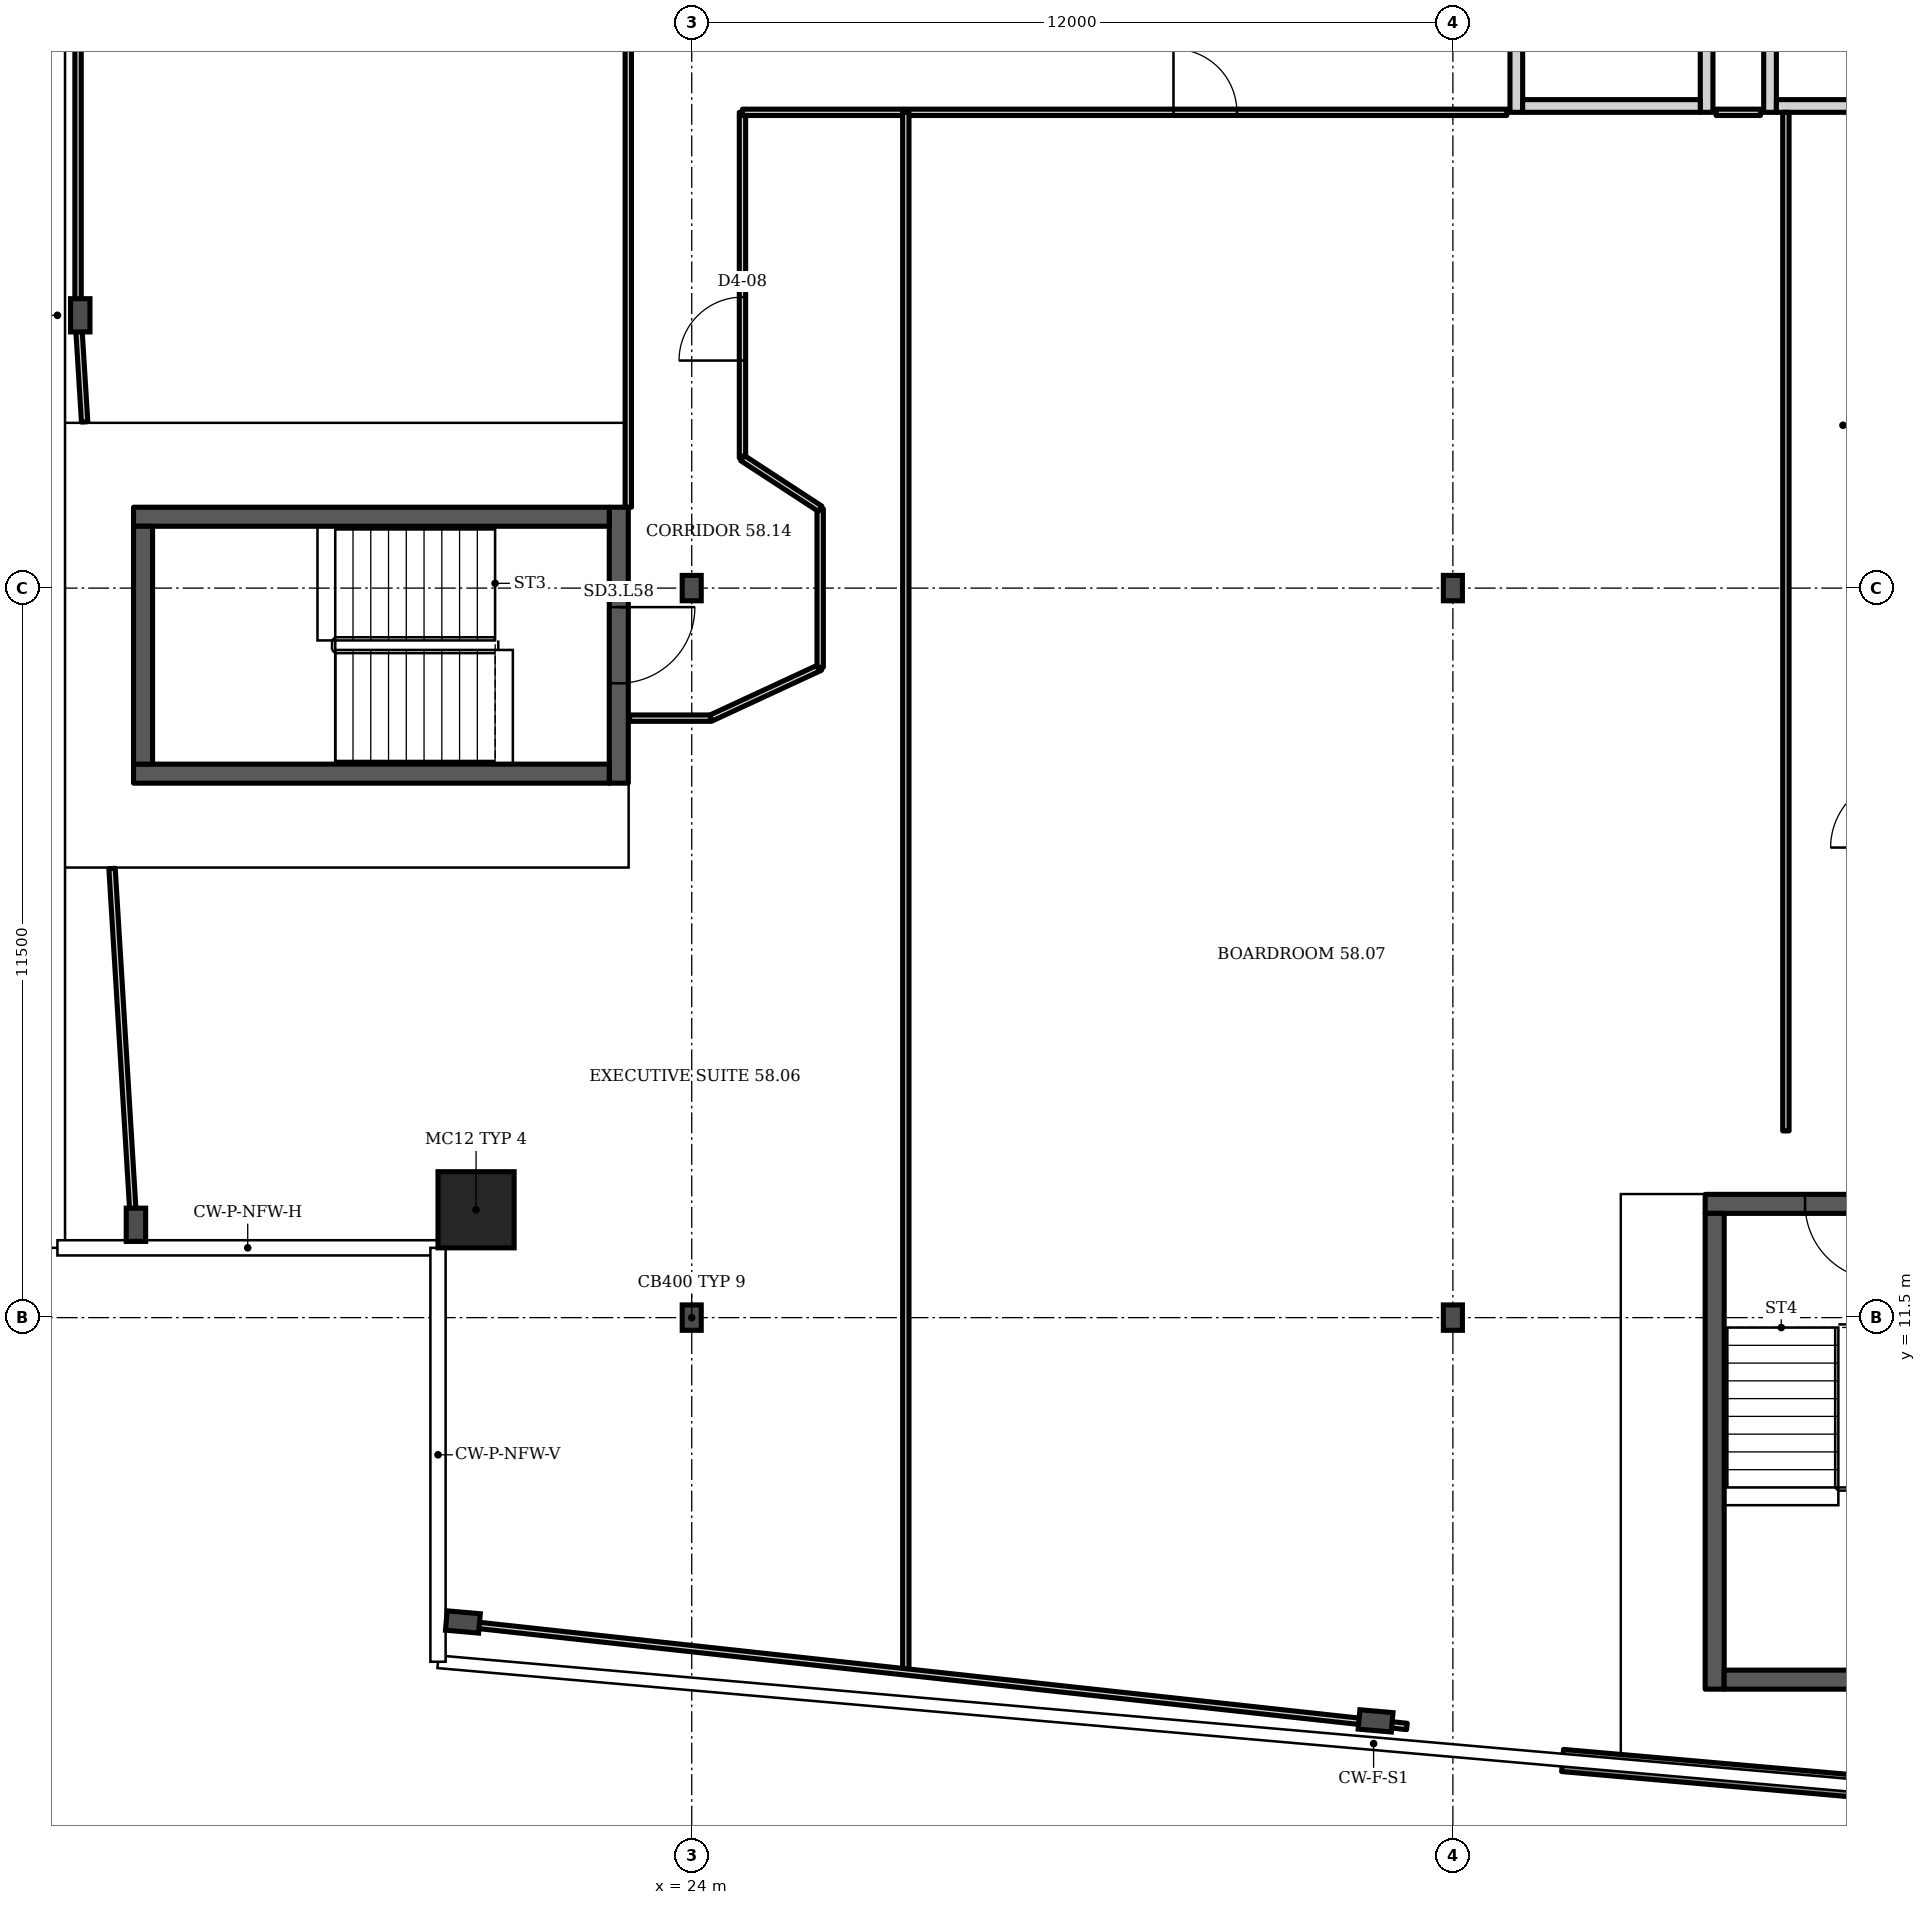
"""IFC4 building model, lengths in metres.
Left out: names, types, materials, properties, quantities, classifications, styles, units other than length and angle.
Written with IfcOpenShell. Run it as: python <this file> out.ifc"""

import sys

from ifc_helpers import new_model, si_unit, direction, frame, frame_2d, origin, origin_2d, place, context, subcontext, project, spatial, rectangle, i_section, extrude, element, fill, save


model = new_model("IFC4")
c1 = context("Model", 3, precision=1e-05, world=origin(), true_north=direction((0.0, 1.0)))
c2 = subcontext(c1, "Body", "Model", "MODEL_VIEW")
j1 = project(units=[si_unit("LENGTHUNIT", "METRE"), si_unit("PLANEANGLEUNIT", "RADIAN")], contexts=[c1])
p1 = place(None, origin())
s1 = spatial("IfcSite", under=j1, at=p1, CompositionType="ELEMENT")
p2 = place(p1, origin())
s2 = spatial("IfcBuilding", under=s1, at=p2, CompositionType="ELEMENT")
p3 = place(p2, frame((0.0, 0.0, 232.3)))
s3 = spatial("IfcBuildingStorey", under=s2, at=p3, CompositionType="ELEMENT", Elevation=232.3)
p4 = place(p3, frame((20.6, 13.2, 0.0), z_axis=(0.0, 0.0, 1.0), x_axis=(1.0, 0.0, 0.0)))
e1 = element("IfcColumn", 1, at=p4, inside=s3, PredefinedType="COLUMN", context=c2, shape_type="SweptSolid", body=[
    extrude(rectangle(XDim=1.2, YDim=1.2, at=origin_2d()), origin(), (0.0, 0.0, 1.0), 3.6),
])
for number, where, z_axis, x_axis in (
    (2, (20.392, 6.703, 0.0), (0.0, 0.0, 1.0), (-0.087, -0.996, 0.0)),
    (3, (34.781, 5.143, 0.0), (0.0, 0.0, 1.0), (-0.087, -0.996, 0.0)),
    (4, (14.36, 27.3, 0.0), (0.0, 0.0, 1.0), (-1.0, 0.0, 0.0)),
    (5, (15.238, 12.963, 0.0), (0.0, 0.0, 1.0), (-1.0, 0.0, 0.0)),
):
    element("IfcColumn", number, at=place(p3, frame(where, z_axis=z_axis, x_axis=x_axis)), inside=s3, PredefinedType="COLUMN", context=c2, shape_type="SweptSolid", body=[
        extrude(i_section(OverallWidth=0.306, OverallDepth=0.524, WebThickness=0.021, FlangeThickness=0.04, FilletRadius=0.027, at=origin_2d()), origin(), (0.0, 0.0, 1.0), 3.6),
    ])
for number, where, z_axis, x_axis in (
    (6, (24.0, 11.5, 0.0), (0.0, 0.0, 1.0), (1.0, 0.0, 0.0)),
    (7, (36.0, 11.5, 0.0), (0.0, 0.0, 1.0), (1.0, 0.0, 0.0)),
    (8, (24.0, 23.0, 0.0), (0.0, 0.0, 1.0), (1.0, 0.0, 0.0)),
    (9, (36.0, 23.0, 0.0), (0.0, 0.0, 1.0), (1.0, 0.0, 0.0)),
):
    element("IfcColumn", number, at=place(p3, frame(where, z_axis=z_axis, x_axis=x_axis)), inside=s3, PredefinedType="COLUMN", context=c2, shape_type="SweptSolid", body=[
        extrude(i_section(OverallWidth=0.3, OverallDepth=0.4, WebThickness=0.013, FlangeThickness=0.024, FilletRadius=0.027, at=origin_2d()), origin(), (0.0, 0.0, 1.0), 3.6),
    ])
p5 = place(p3, frame((37.729, 4.519, 0.0), z_axis=(0.0, 0.0, 1.0), x_axis=(0.99619, -0.087167, 0.0)))
e10 = element("IfcWall", 10, at=p5, inside=s3, PredefinedType="SOLIDWALL", context=c2, shape_type="SweptSolid", body=[
    extrude(rectangle(XDim=11.831, YDim=0.35, at=frame_2d((5.915, 0.0))), origin(), (0.0, 0.0, 1.0), 1.0),
])
p6 = place(p3, frame((37.0, 30.5, 0.0), z_axis=(0.0, 0.0, 1.0), x_axis=(0.0, 1.0, 0.0)))
e11 = element("IfcWall", 11, at=p6, inside=s3, PredefinedType="PARTITIONING", context=c2, shape_type="SweptSolid", body=[
    extrude(rectangle(XDim=3.5, YDim=0.2, at=frame_2d((1.75, 0.0))), origin(), (0.0, 0.0, 1.0), 3.2),
])
p7 = place(p6, frame((1.2, 0.0, 0.0)))
e12 = element("IfcOpeningElement", 12, at=p7, cuts=e11, PredefinedType="OPENING", context=c2, shape_type="SweptSolid", body=[
    extrude(rectangle(XDim=1.1, YDim=2.1, at=frame_2d((0.55, 1.05))), frame((0.0, 0.11, 0.0), z_axis=(0.0, -1.0, 0.0), x_axis=(1.0, 0.0, 0.0)), (0.0, 0.0, 1.0), 0.22),
])
p8 = place(p3, frame((40.0, 30.5, 0.0), z_axis=(0.0, 0.0, 1.0), x_axis=(0.0, 1.0, 0.0)))
e13 = element("IfcWall", 13, at=p8, inside=s3, PredefinedType="PARTITIONING", context=c2, shape_type="SweptSolid", body=[
    extrude(rectangle(XDim=3.5, YDim=0.2, at=frame_2d((1.75, 0.0))), origin(), (0.0, 0.0, 1.0), 3.2),
])
p9 = place(p3, frame((37.1, 30.6, 0.0), z_axis=(0.0, 0.0, 1.0), x_axis=(1.0, 0.0, 0.0)))
e14 = element("IfcWall", 14, at=p9, inside=s3, PredefinedType="PARTITIONING", context=c2, shape_type="SweptSolid", body=[
    extrude(rectangle(XDim=2.8, YDim=0.2, at=frame_2d((1.4, 0.0))), origin(), (0.0, 0.0, 1.0), 3.2),
])
p10 = place(p3, frame((41.0, 30.5, 0.0), z_axis=(0.0, 0.0, 1.0), x_axis=(0.0, 1.0, 0.0)))
e15 = element("IfcWall", 15, at=p10, inside=s3, PredefinedType="PARTITIONING", context=c2, shape_type="SweptSolid", body=[
    extrude(rectangle(XDim=3.5, YDim=0.2, at=frame_2d((1.75, 0.0))), origin(), (0.0, 0.0, 1.0), 3.2),
])
p11 = place(p3, frame((41.1, 30.6, 0.0), z_axis=(0.0, 0.0, 1.0), x_axis=(1.0, 0.0, 0.0)))
e16 = element("IfcWall", 16, at=p11, inside=s3, PredefinedType="PARTITIONING", context=c2, shape_type="SweptSolid", body=[
    extrude(rectangle(XDim=2.8, YDim=0.2, at=frame_2d((1.4, 0.0))), origin(), (0.0, 0.0, 1.0), 3.2),
])
p12 = place(p3, frame((22.85, 19.925, 0.0), z_axis=(0.0, 0.0, 1.0), x_axis=(0.0, 1.0, 0.0)))
e17 = element("IfcWall", 17, at=p12, inside=s3, PredefinedType="SHEAR", context=c2, shape_type="SweptSolid", body=[
    extrude(rectangle(XDim=4.35, YDim=0.3, at=frame_2d((2.175, 0.0))), origin(), (0.0, 0.0, 1.0), 3.2),
])
p13 = place(p12, frame((1.575, 0.0, 0.0)))
e18 = element("IfcOpeningElement", 18, at=p13, cuts=e17, PredefinedType="OPENING", context=c2, shape_type="SweptSolid", body=[
    extrude(rectangle(XDim=1.2, YDim=2.1, at=frame_2d((0.6, 1.05))), frame((0.0, 0.16, 0.0), z_axis=(0.0, -1.0, 0.0), x_axis=(1.0, 0.0, 0.0)), (0.0, 0.0, 1.0), 0.32),
])
p14 = place(p3, frame((39.977, 13.293, 0.0), z_axis=(0.0, 0.0, 1.0), x_axis=(1.0, 0.0, 0.0)))
e19 = element("IfcWall", 19, at=p14, inside=s3, PredefinedType="SHEAR", context=c2, shape_type="SweptSolid", body=[
    extrude(rectangle(XDim=4.35, YDim=0.3, at=frame_2d((2.175, 0.0))), origin(), (0.0, 0.0, 1.0), 3.2),
])
p15 = place(p14, frame((1.575, 0.0, 0.0)))
e20 = element("IfcOpeningElement", 20, at=p15, cuts=e19, PredefinedType="OPENING", context=c2, shape_type="SweptSolid", body=[
    extrude(rectangle(XDim=1.2, YDim=2.1, at=frame_2d((0.6, 1.05))), frame((0.0, 0.16, 0.0), z_axis=(0.0, -1.0, 0.0), x_axis=(1.0, 0.0, 0.0)), (0.0, 0.0, 1.0), 0.32),
])
p16 = place(p3, frame((14.325, 27.3, 0.0), z_axis=(0.0, 0.0, 1.0), x_axis=(0.0, 1.0, 0.0)))
e21 = element("IfcWall", 21, at=p16, inside=s3, PredefinedType="PARTITIONING", context=c2, shape_type="SweptSolid", body=[
    extrude(rectangle(XDim=14.68, YDim=0.1, at=frame_2d((7.34, 0.0))), origin(), (0.0, 0.0, 1.0), 2.58),
])
p17 = place(p3, frame((14.429, 25.62, 0.0), z_axis=(0.0, 0.0, 1.0), x_axis=(-0.061647, 0.998101, 0.0)))
e22 = element("IfcWall", 22, at=p17, inside=s3, PredefinedType="PARTITIONING", context=c2, shape_type="SweptSolid", body=[
    extrude(rectangle(XDim=1.683, YDim=0.1, at=frame_2d((0.842, 0.0))), origin(), (0.0, 0.0, 1.0), 3.2),
])
p18 = place(p3, frame((15.224, 12.62, 0.0), z_axis=(0.0, 0.0, 1.0), x_axis=(-0.060759, 0.998149, 0.0)))
e23 = element("IfcWall", 23, at=p18, inside=s3, PredefinedType="PARTITIONING", context=c2, shape_type="SweptSolid", body=[
    extrude(rectangle(XDim=5.971, YDim=0.1, at=frame_2d((2.985, 0.0))), origin(), (0.0, 0.0, 1.0), 3.2),
])
p19 = place(p3, frame((23.0, 24.275, 0.0), z_axis=(0.0, 0.0, 1.0), x_axis=(0.0, 1.0, 0.0)))
e24 = element("IfcWall", 24, at=p19, inside=s3, PredefinedType="PARTITIONING", context=c2, shape_type="SweptSolid", body=[
    extrude(rectangle(XDim=9.705, YDim=0.1, at=frame_2d((4.853, 0.0))), origin(), (0.0, 0.0, 1.0), 3.2),
])
p20 = place(p19, frame((7.905, 0.0, 0.0)))
e25 = element("IfcOpeningElement", 25, at=p20, cuts=e24, PredefinedType="OPENING", context=c2, shape_type="SweptSolid", body=[
    extrude(rectangle(XDim=1.0, YDim=2.1, at=frame_2d((0.5, 1.05))), frame((0.0, 0.06, 0.0), z_axis=(0.0, -1.0, 0.0), x_axis=(1.0, 0.0, 0.0)), (0.0, 0.0, 1.0), 0.12),
])
p21 = place(p3, frame((23.02, 20.95, 0.0), z_axis=(0.0, 0.0, 1.0), x_axis=(1.0, 0.0, 0.0)))
e26 = element("IfcWall", 26, at=p21, inside=s3, PredefinedType="PARTITIONING", context=c2, shape_type="SweptSolid", body=[
    extrude(rectangle(XDim=1.28, YDim=0.1, at=frame_2d((0.64, 0.0))), origin(), (0.0, 0.0, 1.0), 3.2),
])
p22 = place(p3, frame((24.3, 20.95, 0.0), z_axis=(0.0, 0.0, 1.0), x_axis=(0.907168, 0.420777, 0.0)))
e27 = element("IfcWall", 27, at=p22, inside=s3, PredefinedType="PARTITIONING", context=c2, shape_type="SweptSolid", body=[
    extrude(rectangle(XDim=1.901, YDim=0.1, at=frame_2d((0.951, 0.0))), origin(), (0.0, 0.0, 1.0), 3.2),
])
p23 = place(p3, frame((24.8, 25.05, 0.0), z_axis=(0.0, 0.0, 1.0), x_axis=(0.0, 1.0, 0.0)))
e28 = element("IfcWall", 28, at=p23, inside=s3, PredefinedType="PARTITIONING", context=c2, shape_type="SweptSolid", body=[
    extrude(rectangle(XDim=5.45, YDim=0.1, at=frame_2d((2.725, 0.0))), origin(), (0.0, 0.0, 1.0), 3.2),
])
p24 = place(p23, frame((1.537, 0.0, 0.0)))
e29 = element("IfcOpeningElement", 29, at=p24, cuts=e28, PredefinedType="OPENING", context=c2, shape_type="SweptSolid", body=[
    extrude(rectangle(XDim=1.0, YDim=2.1, at=frame_2d((0.5, 1.05))), frame((0.0, 0.06, 0.0), z_axis=(0.0, -1.0, 0.0), x_axis=(1.0, 0.0, 0.0)), (0.0, 0.0, 1.0), 0.12),
])
p25 = place(p3, frame((24.8, 30.5, 0.0), z_axis=(0.0, 0.0, 1.0), x_axis=(1.0, 0.0, 0.0)))
e30 = element("IfcWall", 30, at=p25, inside=s3, PredefinedType="PARTITIONING", context=c2, shape_type="SweptSolid", body=[
    extrude(rectangle(XDim=12.05, YDim=0.1, at=frame_2d((6.025, 0.0))), origin(), (0.0, 0.0, 1.0), 3.2),
])
p26 = place(p25, frame((6.795, 0.0, 0.0)))
e31 = element("IfcOpeningElement", 31, at=p26, cuts=e30, PredefinedType="OPENING", context=c2, shape_type="SweptSolid", body=[
    extrude(rectangle(XDim=1.0, YDim=2.1, at=frame_2d((0.5, 1.05))), frame((0.0, 0.06, 0.0), z_axis=(0.0, -1.0, 0.0), x_axis=(1.0, 0.0, 0.0)), (0.0, 0.0, 1.0), 0.12),
])
p27 = place(p3, frame((26.025, 21.75, 0.0), z_axis=(0.0, 0.0, 1.0), x_axis=(0.0, 1.0, 0.0)))
e32 = element("IfcWall", 32, at=p27, inside=s3, PredefinedType="PARTITIONING", context=c2, shape_type="SweptSolid", body=[
    extrude(rectangle(XDim=2.5, YDim=0.1, at=frame_2d((1.25, 0.0))), origin(), (0.0, 0.0, 1.0), 3.2),
])
p28 = place(p3, frame((26.025, 24.25, 0.0), z_axis=(0.0, 0.0, 1.0), x_axis=(-0.837222, 0.546856, 0.0)))
e33 = element("IfcWall", 33, at=p28, inside=s3, PredefinedType="PARTITIONING", context=c2, shape_type="SweptSolid", body=[
    extrude(rectangle(XDim=1.463, YDim=0.1, at=frame_2d((0.731, 0.0))), origin(), (0.0, 0.0, 1.0), 3.2),
])
p29 = place(p3, frame((27.375, 5.915, 0.0), z_axis=(0.0, 0.0, 1.0), x_axis=(0.0, 1.0, 0.0)))
e34 = element("IfcWall", 34, at=p29, inside=s3, PredefinedType="PARTITIONING", context=c2, shape_type="SweptSolid", body=[
    extrude(rectangle(XDim=24.585, YDim=0.1, at=frame_2d((12.292, 0.0))), origin(), (0.0, 0.0, 1.0), 3.2),
])
p30 = place(p3, frame((35.275, 5.055, 0.0), z_axis=(0.0, 0.0, 1.0), x_axis=(-0.994128, 0.108228, 0.0)))
e35 = element("IfcWall", 35, at=p30, inside=s3, PredefinedType="PARTITIONING", context=c2, shape_type="SweptSolid", body=[
    extrude(rectangle(XDim=15.335, YDim=0.1, at=frame_2d((7.667, 0.0))), origin(), (0.0, 0.0, 1.0), 2.58),
])
p31 = place(p3, frame((41.25, 14.443, 0.0), z_axis=(0.0, 0.0, 1.0), x_axis=(0.0, 1.0, 0.0)))
e36 = element("IfcWall", 36, at=p31, inside=s3, PredefinedType="PARTITIONING", context=c2, shape_type="SweptSolid", body=[
    extrude(rectangle(XDim=16.057, YDim=0.1, at=frame_2d((8.028, 0.0))), origin(), (0.0, 0.0, 1.0), 3.2),
])
p32 = place(p3, frame((40.15, 30.5, 0.0), z_axis=(0.0, 0.0, 1.0), x_axis=(1.0, 0.0, 0.0)))
e37 = element("IfcWall", 37, at=p32, inside=s3, PredefinedType="PARTITIONING", context=c2, shape_type="SweptSolid", body=[
    extrude(rectangle(XDim=0.7, YDim=0.1, at=frame_2d((0.35, 0.0))), origin(), (0.0, 0.0, 1.0), 3.2),
])
for number, where, z_axis, x_axis in (
    (38, (15.2, 20.075, 0.0), (0.0, 0.0, 1.0), (1.0, 0.0, 0.0)),
    (39, (15.2, 24.125, 0.0), (0.0, 0.0, 1.0), (1.0, 0.0, 0.0)),
):
    element("IfcWall", number, at=place(p3, frame(where, z_axis=z_axis, x_axis=x_axis)), inside=s3, PredefinedType="SHEAR", context=c2, shape_type="SweptSolid", body=[
        extrude(rectangle(XDim=7.5, YDim=0.3, at=frame_2d((3.75, 0.0))), origin(), (0.0, 0.0, 1.0), 3.2),
    ])
p33 = place(p3, frame((15.35, 20.225, 0.0), z_axis=(0.0, 0.0, 1.0), x_axis=(0.0, 1.0, 0.0)))
e40 = element("IfcWall", 40, at=p33, inside=s3, PredefinedType="SHEAR", context=c2, shape_type="SweptSolid", body=[
    extrude(rectangle(XDim=3.75, YDim=0.3, at=frame_2d((1.875, 0.0))), origin(), (0.0, 0.0, 1.0), 3.2),
])
p34 = place(p3, frame((40.127, 5.643, 0.0), z_axis=(0.0, 0.0, 1.0), x_axis=(0.0, 1.0, 0.0)))
e41 = element("IfcWall", 41, at=p34, inside=s3, PredefinedType="SHEAR", context=c2, shape_type="SweptSolid", body=[
    extrude(rectangle(XDim=7.5, YDim=0.3, at=frame_2d((3.75, 0.0))), origin(), (0.0, 0.0, 1.0), 3.2),
])
p35 = place(p3, frame((40.277, 5.793, 0.0), z_axis=(0.0, 0.0, 1.0), x_axis=(1.0, 0.0, 0.0)))
e42 = element("IfcWall", 42, at=p35, inside=s3, PredefinedType="SHEAR", context=c2, shape_type="SweptSolid", body=[
    extrude(rectangle(XDim=3.75, YDim=0.3, at=frame_2d((1.875, 0.0))), origin(), (0.0, 0.0, 1.0), 3.2),
])
p36 = place(p13, origin())
e43 = element("IfcDoor", 43, at=p36, inside=s3, OperationType="SINGLE_SWING_RIGHT", PredefinedType="DOOR", context=c2, shape_type="SweptSolid", body=[
    extrude(rectangle(XDim=1.2, YDim=2.1, at=frame_2d((0.6, 1.05))), frame((0.0, 0.025, 0.0), z_axis=(0.0, -1.0, 0.0), x_axis=(1.0, 0.0, 0.0)), (0.0, 0.0, 1.0), 0.05),
])
fill(e18, e43)
p37 = place(p15, origin())
e44 = element("IfcDoor", 44, at=p37, inside=s3, OperationType="SINGLE_SWING_RIGHT", PredefinedType="DOOR", context=c2, shape_type="SweptSolid", body=[
    extrude(rectangle(XDim=1.2, YDim=2.1, at=frame_2d((0.6, 1.05))), frame((0.0, 0.025, 0.0), z_axis=(0.0, -1.0, 0.0), x_axis=(1.0, 0.0, 0.0)), (0.0, 0.0, 1.0), 0.05),
])
fill(e20, e44)
p38 = place(p24, origin())
e45 = element("IfcDoor", 45, at=p38, inside=s3, OperationType="SINGLE_SWING_LEFT", PredefinedType="DOOR", context=c2, shape_type="SweptSolid", body=[
    extrude(rectangle(XDim=1.0, YDim=2.1, at=frame_2d((0.5, 1.05))), frame((0.0, 0.025, 0.0), z_axis=(0.0, -1.0, 0.0), x_axis=(1.0, 0.0, 0.0)), (0.0, 0.0, 1.0), 0.05),
])
fill(e29, e45)
p39 = place(p26, origin())
e46 = element("IfcDoor", 46, at=p39, inside=s3, OperationType="SINGLE_SWING_LEFT", PredefinedType="DOOR", context=c2, shape_type="SweptSolid", body=[
    extrude(rectangle(XDim=1.0, YDim=2.1, at=frame_2d((0.5, 1.05))), frame((0.0, 0.025, 0.0), z_axis=(0.0, -1.0, 0.0), x_axis=(1.0, 0.0, 0.0)), (0.0, 0.0, 1.0), 0.05),
])
fill(e31, e46)
save(model, sys.argv[1])
